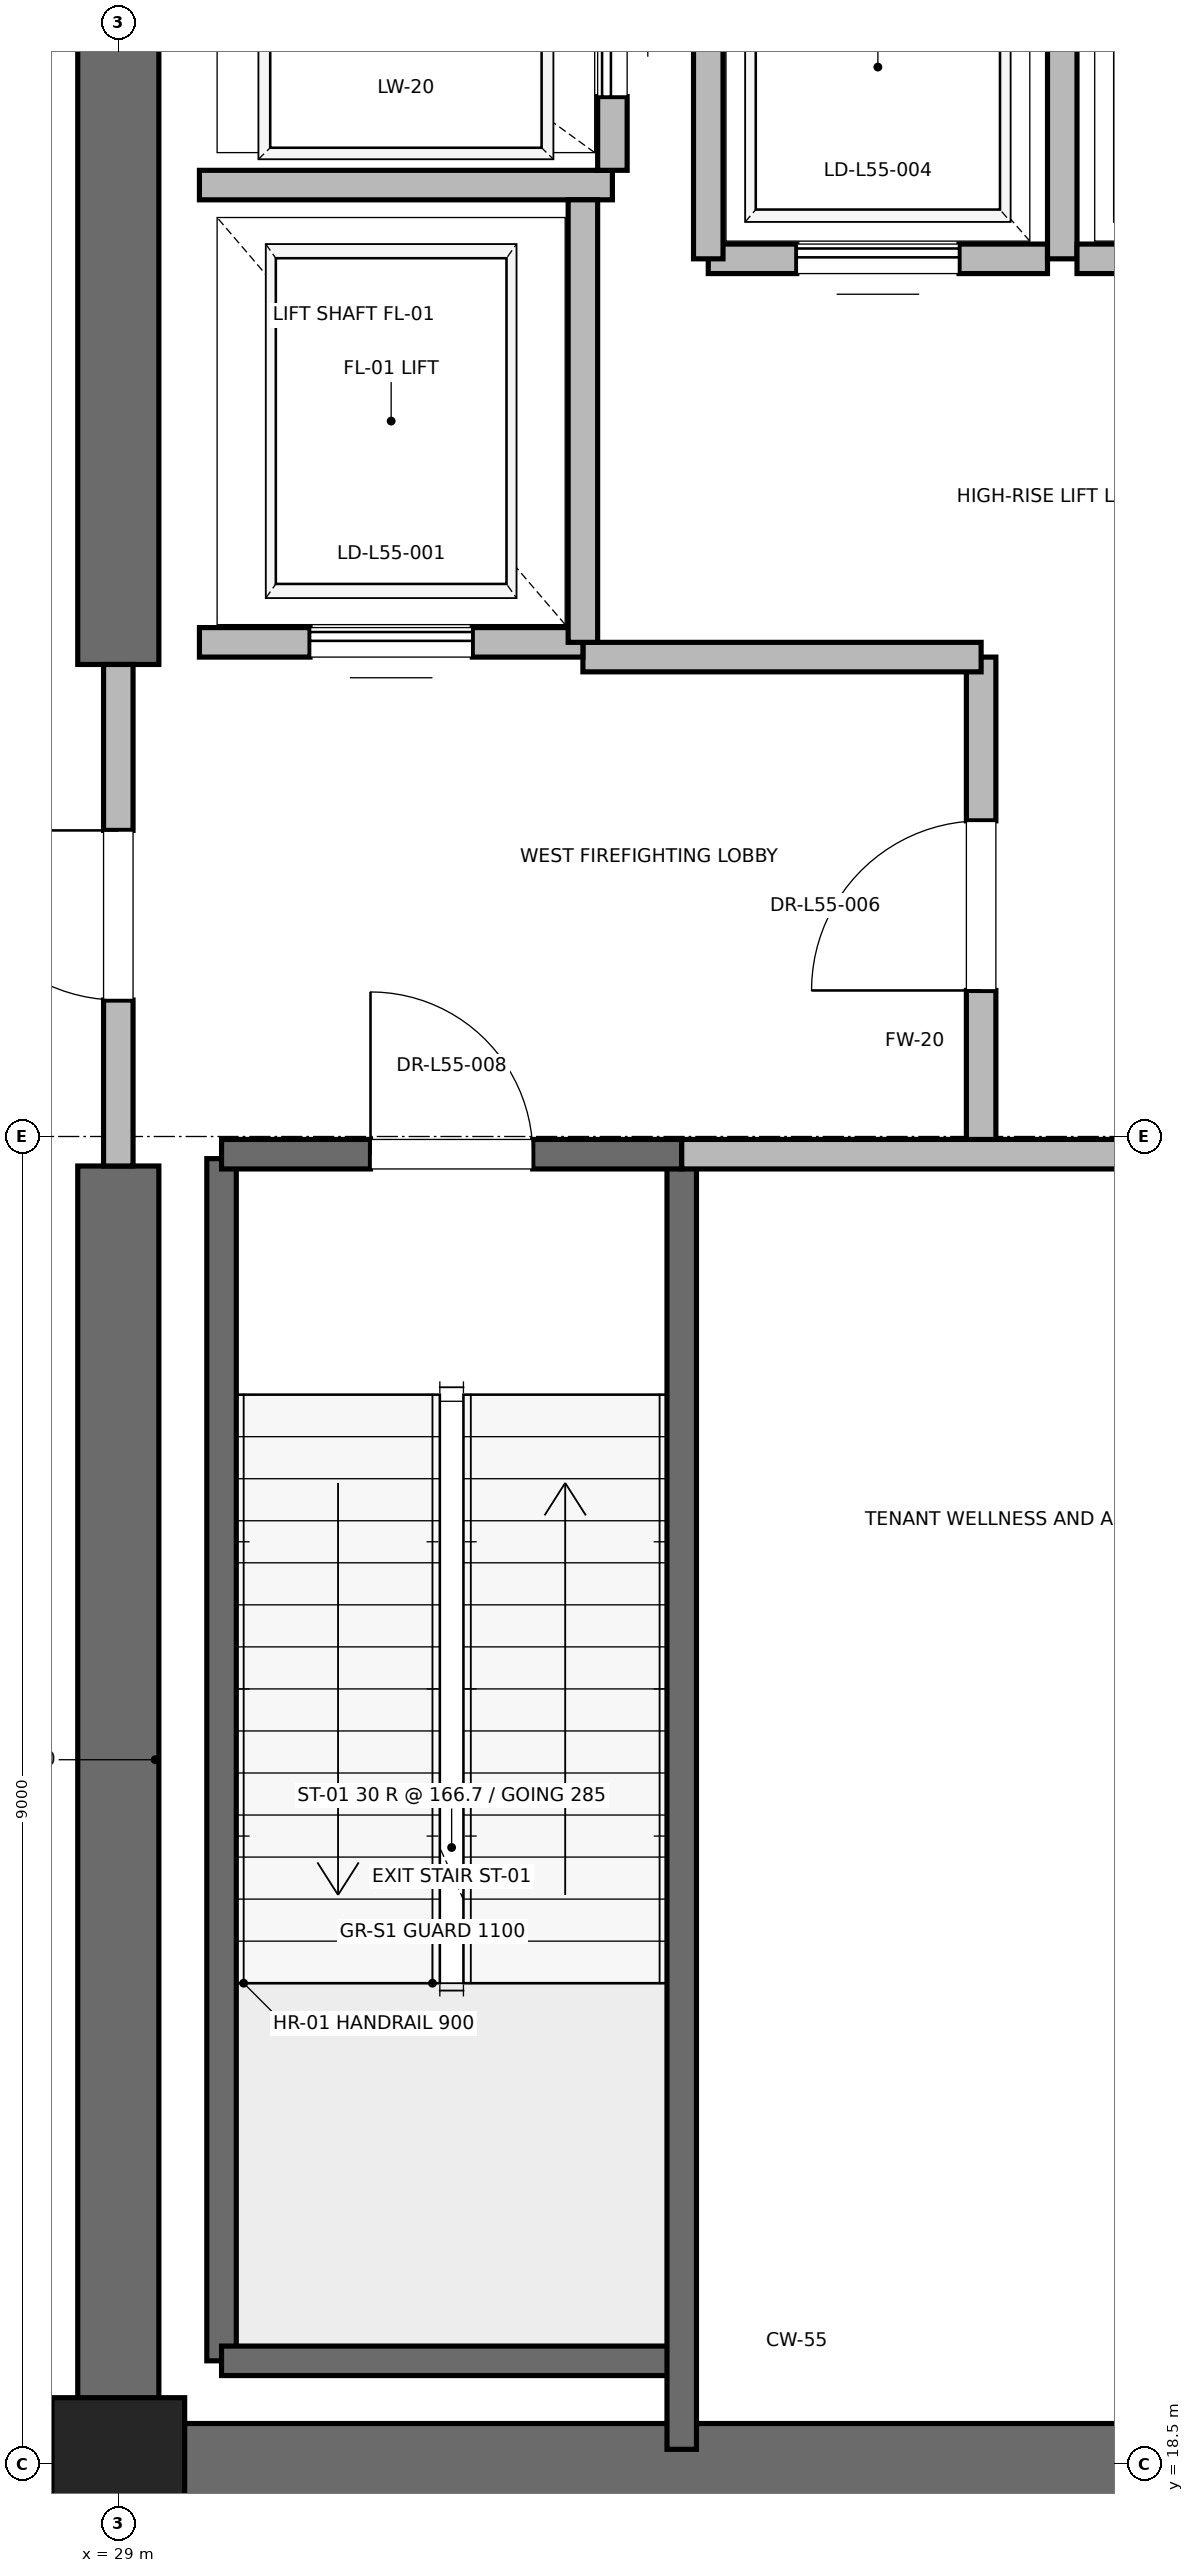
"""IFC4 building model, lengths in metres.
Left out: names, types, materials, properties, quantities, classifications, styles, units other than length and angle.
Written with IfcOpenShell. Run it as: python <this file> out.ifc"""

import sys

from ifc_helpers import new_model, si_unit, direction, frame, frame_2d, origin, origin_2d, place, context, subcontext, project, spatial, rectangle, extrude, element, fill, save


model = new_model("IFC4")
c1 = context("Model", 3, precision=1e-05, world=origin(), true_north=direction((0.0, 1.0)))
c2 = subcontext(c1, "Body", "Model", "MODEL_VIEW")
j1 = project(units=[si_unit("LENGTHUNIT", "METRE"), si_unit("PLANEANGLEUNIT", "RADIAN")], contexts=[c1])
p1 = place(None, origin())
s1 = spatial("IfcSite", under=j1, at=p1, CompositionType="ELEMENT")
p2 = place(p1, origin())
s2 = spatial("IfcBuilding", under=s1, at=p2, CompositionType="ELEMENT")
p3 = place(p2, frame((0.0, 0.0, 238.2)))
s3 = spatial("IfcBuildingStorey", under=s2, at=p3, CompositionType="ELEMENT", Elevation=238.2)
p4 = place(p3, frame((29.0, 18.5, 0.0), z_axis=(0.0, 0.0, 1.0), x_axis=(1.0, 0.0, 0.0)))
e1 = element("IfcColumn", 1, at=p4, inside=s3, PredefinedType="PILASTER", context=c2, shape_type="SweptSolid", body=[
    extrude(rectangle(XDim=0.9, YDim=0.9, at=origin_2d()), origin(), (0.0, 0.0, 1.0), 5.0),
])
p5 = place(p3, frame((29.0, 18.5, 0.0), z_axis=(0.0, 0.0, 1.0), x_axis=(1.0, 0.0, 0.0)))
e2 = element("IfcWall", 2, at=p5, inside=s3, PredefinedType="SHEAR", context=c2, shape_type="SweptSolid", body=[
    extrude(rectangle(XDim=9.2, YDim=0.55, at=frame_2d((4.6, 0.0))), origin(), (0.0, 0.0, 1.0), 4.785),
])
p6 = place(p3, frame((29.0, 18.5, 0.0), z_axis=(0.0, 0.0, 1.0), x_axis=(0.0, 1.0, 0.0)))
e3 = element("IfcWall", 3, at=p6, inside=s3, PredefinedType="SHEAR", context=c2, shape_type="SweptSolid", body=[
    extrude(rectangle(XDim=8.8, YDim=0.55, at=frame_2d((4.4, 0.0))), origin(), (0.0, 0.0, 1.0), 4.785),
])
p7 = place(p3, frame((29.0, 30.7, 0.0), z_axis=(0.0, 0.0, 1.0), x_axis=(0.0, 1.0, 0.0)))
e4 = element("IfcWall", 4, at=p7, inside=s3, PredefinedType="SHEAR", context=c2, shape_type="SweptSolid", body=[
    extrude(rectangle(XDim=5.8, YDim=0.55, at=frame_2d((2.9, 0.0))), origin(), (0.0, 0.0, 1.0), 4.785),
])
p8 = place(p3, frame((29.7, 19.2, 0.0), z_axis=(0.0, 0.0, 1.0), x_axis=(0.0, 1.0, 0.0)))
e5 = element("IfcWall", 5, at=p8, inside=s3, PredefinedType="SOLIDWALL", context=c2, shape_type="SweptSolid", body=[
    extrude(rectangle(XDim=8.15, YDim=0.2, at=frame_2d((4.075, 0.0))), origin(), (0.0, 0.0, 1.0), 4.785),
])
p9 = place(p3, frame((29.7, 19.2, 0.0), z_axis=(0.0, 0.0, 1.0), x_axis=(1.0, 0.0, 0.0)))
e6 = element("IfcWall", 6, at=p9, inside=s3, PredefinedType="SOLIDWALL", context=c2, shape_type="SweptSolid", body=[
    extrude(rectangle(XDim=3.12, YDim=0.2, at=frame_2d((1.56, 0.0))), origin(), (0.0, 0.0, 1.0), 4.785),
])
p10 = place(p3, frame((32.82, 18.6, 0.0), z_axis=(0.0, 0.0, 1.0), x_axis=(0.0, 1.0, 0.0)))
e7 = element("IfcWall", 7, at=p10, inside=s3, PredefinedType="SOLIDWALL", context=c2, shape_type="SweptSolid", body=[
    extrude(rectangle(XDim=8.78, YDim=0.2, at=frame_2d((4.39, 0.0))), origin(), (0.0, 0.0, 1.0), 4.785),
])
p11 = place(p3, frame((29.7, 27.38, 0.0), z_axis=(0.0, 0.0, 1.0), x_axis=(1.0, 0.0, 0.0)))
e8 = element("IfcWall", 8, at=p11, inside=s3, PredefinedType="SOLIDWALL", context=c2, shape_type="SweptSolid", body=[
    extrude(rectangle(XDim=3.12, YDim=0.2, at=frame_2d((1.56, 0.0))), origin(), (0.0, 0.0, 1.0), 4.785),
])
p12 = place(p11, frame((1.01, 0.0, 0.0)))
e9 = element("IfcOpeningElement", 9, at=p12, cuts=e8, PredefinedType="OPENING", context=c2, shape_type="SweptSolid", body=[
    extrude(rectangle(XDim=1.1, YDim=2.15, at=frame_2d((0.55, 1.075))), frame((0.0, 0.1, 0.0), z_axis=(0.0, -1.0, 0.0), x_axis=(1.0, 0.0, 0.0)), (0.0, 0.0, 1.0), 0.2),
])
p13 = place(p3, frame((34.85, 27.38, 0.0), z_axis=(0.0, 0.0, 1.0), x_axis=(0.0, 1.0, 0.0)))
e10 = element("IfcWall", 10, at=p13, inside=s3, PredefinedType="PARTITIONING", context=c2, shape_type="SweptSolid", body=[
    extrude(rectangle(XDim=3.37, YDim=0.2, at=frame_2d((1.685, 0.0))), origin(), (0.0, 0.0, 1.0), 4.785),
])
p14 = place(p13, frame((1.11, 0.0, 0.0)))
e11 = element("IfcOpeningElement", 11, at=p14, cuts=e10, PredefinedType="OPENING", context=c2, shape_type="SweptSolid", body=[
    extrude(rectangle(XDim=1.15, YDim=2.2, at=frame_2d((0.575, 1.1))), frame((0.0, 0.1, 0.0), z_axis=(0.0, -1.0, 0.0), x_axis=(1.0, 0.0, 0.0)), (0.0, 0.0, 1.0), 0.2),
])
p15 = place(p3, frame((29.0, 27.3, 0.0), z_axis=(0.0, 0.0, 1.0), x_axis=(0.0, 1.0, 0.0)))
e12 = element("IfcWall", 12, at=p15, inside=s3, PredefinedType="PARTITIONING", context=c2, shape_type="SweptSolid", body=[
    extrude(rectangle(XDim=3.4, YDim=0.2, at=frame_2d((1.7, 0.0))), origin(), (0.0, 0.0, 1.0), 3.765),
])
p16 = place(p15, frame((1.125, 0.0, 0.0)))
e13 = element("IfcOpeningElement", 13, at=p16, cuts=e12, PredefinedType="OPENING", context=c2, shape_type="SweptSolid", body=[
    extrude(rectangle(XDim=1.15, YDim=2.2, at=frame_2d((0.575, 1.1))), frame((0.0, 0.1, 0.0), z_axis=(0.0, -1.0, 0.0), x_axis=(1.0, 0.0, 0.0)), (0.0, 0.0, 1.0), 0.2),
])
p17 = place(p3, frame((32.82, 27.38, 0.0), z_axis=(0.0, 0.0, 1.0), x_axis=(1.0, 0.0, 0.0)))
e14 = element("IfcWall", 14, at=p17, inside=s3, PredefinedType="PARTITIONING", context=c2, shape_type="SweptSolid", body=[
    extrude(rectangle(XDim=5.62, YDim=0.2, at=frame_2d((2.81, 0.0))), origin(), (0.0, 0.0, 1.0), 4.785),
])
p18 = place(p3, frame((32.15, 30.75, 0.0), z_axis=(0.0, 0.0, 1.0), x_axis=(1.0, 0.0, 0.0)))
e15 = element("IfcWall", 15, at=p18, inside=s3, PredefinedType="PARTITIONING", context=c2, shape_type="SweptSolid", body=[
    extrude(rectangle(XDim=2.7, YDim=0.2, at=frame_2d((1.35, 0.0))), origin(), (0.0, 0.0, 1.0), 4.785),
])
p19 = place(p3, frame((29.55, 30.85, 0.0), z_axis=(0.0, 0.0, 1.0), x_axis=(1.0, 0.0, 0.0)))
e16 = element("IfcWall", 16, at=p19, inside=s3, PredefinedType="SOLIDWALL", context=c2, shape_type="SweptSolid", body=[
    extrude(rectangle(XDim=2.6, YDim=0.2, at=frame_2d((1.3, 0.0))), origin(), (0.0, 0.0, 1.0), 3.765),
])
p20 = place(p19, frame((0.75, 0.0, 0.0)))
e17 = element("IfcOpeningElement", 17, at=p20, cuts=e16, PredefinedType="OPENING", context=c2, shape_type="SweptSolid", body=[
    extrude(rectangle(XDim=1.1, YDim=2.2, at=frame_2d((0.55, 1.1))), frame((0.0, 0.1, 0.0), z_axis=(0.0, -1.0, 0.0), x_axis=(1.0, 0.0, 0.0)), (0.0, 0.0, 1.0), 0.2),
])
p21 = place(p3, frame((29.55, 33.95, 0.0), z_axis=(0.0, 0.0, 1.0), x_axis=(1.0, 0.0, 0.0)))
e18 = element("IfcWall", 18, at=p21, inside=s3, PredefinedType="SOLIDWALL", context=c2, shape_type="SweptSolid", body=[
    extrude(rectangle(XDim=2.8, YDim=0.2, at=frame_2d((1.4, 0.0))), origin(), (0.0, 0.0, 1.0), 4.785),
])
p22 = place(p3, frame((32.15, 30.85, 0.0), z_axis=(0.0, 0.0, 1.0), x_axis=(0.0, 1.0, 0.0)))
e19 = element("IfcWall", 19, at=p22, inside=s3, PredefinedType="SOLIDWALL", context=c2, shape_type="SweptSolid", body=[
    extrude(rectangle(XDim=3.0, YDim=0.2, at=frame_2d((1.5, 0.0))), origin(), (0.0, 0.0, 1.0), 4.785),
])
p23 = place(p3, frame((32.35, 34.05, 0.0), z_axis=(0.0, 0.0, 1.0), x_axis=(0.0, 1.0, 0.0)))
e20 = element("IfcWall", 20, at=p23, inside=s3, PredefinedType="SOLIDWALL", context=c2, shape_type="SweptSolid", body=[
    extrude(rectangle(XDim=2.1, YDim=0.2, at=frame_2d((1.05, 0.0))), origin(), (0.0, 0.0, 1.0), 4.785),
])
p24 = place(p23, frame((0.5, 0.0, 0.0)))
e21 = element("IfcOpeningElement", 21, at=p24, cuts=e20, PredefinedType="OPENING", context=c2, shape_type="SweptSolid", body=[
    extrude(rectangle(XDim=1.1, YDim=2.2, at=frame_2d((0.55, 1.1))), frame((0.0, 0.1, 0.0), z_axis=(0.0, -1.0, 0.0), x_axis=(1.0, 0.0, 0.0)), (0.0, 0.0, 1.0), 0.2),
])
p25 = place(p3, frame((33.0, 33.45, 0.0), z_axis=(0.0, 0.0, 1.0), x_axis=(1.0, 0.0, 0.0)))
e22 = element("IfcWall", 22, at=p25, inside=s3, PredefinedType="SOLIDWALL", context=c2, shape_type="SweptSolid", body=[
    extrude(rectangle(XDim=2.3, YDim=0.2, at=frame_2d((1.15, 0.0))), origin(), (0.0, 0.0, 1.0), 4.785),
])
p26 = place(p25, frame((0.6, 0.0, 0.0)))
e23 = element("IfcOpeningElement", 23, at=p26, cuts=e22, PredefinedType="OPENING", context=c2, shape_type="SweptSolid", body=[
    extrude(rectangle(XDim=1.1, YDim=2.2, at=frame_2d((0.55, 1.1))), frame((0.0, 0.1, 0.0), z_axis=(0.0, -1.0, 0.0), x_axis=(1.0, 0.0, 0.0)), (0.0, 0.0, 1.0), 0.2),
])
p27 = place(p3, frame((33.0, 36.05, 0.0), z_axis=(0.0, 0.0, 1.0), x_axis=(0.0, -1.0, 0.0)))
e24 = element("IfcWall", 24, at=p27, inside=s3, PredefinedType="SOLIDWALL", context=c2, shape_type="SweptSolid", body=[
    extrude(rectangle(XDim=2.6, YDim=0.2, at=frame_2d((1.3, 0.0))), origin(), (0.0, 0.0, 1.0), 4.785),
])
p28 = place(p3, frame((35.4, 33.45, 0.0), z_axis=(0.0, 0.0, 1.0), x_axis=(0.0, 1.0, 0.0)))
e25 = element("IfcWall", 25, at=p28, inside=s3, PredefinedType="SOLIDWALL", context=c2, shape_type="SweptSolid", body=[
    extrude(rectangle(XDim=2.6, YDim=0.2, at=frame_2d((1.3, 0.0))), origin(), (0.0, 0.0, 1.0), 3.765),
])
p29 = place(p3, frame((35.5, 33.45, 0.0), z_axis=(0.0, 0.0, 1.0), x_axis=(1.0, 0.0, 0.0)))
e26 = element("IfcWall", 26, at=p29, inside=s3, PredefinedType="SOLIDWALL", context=c2, shape_type="SweptSolid", body=[
    extrude(rectangle(XDim=2.3, YDim=0.2, at=frame_2d((1.15, 0.0))), origin(), (0.0, 0.0, 1.0), 4.785),
])
p30 = place(p29, frame((0.6, 0.0, 0.0)))
e27 = element("IfcOpeningElement", 27, at=p30, cuts=e26, PredefinedType="OPENING", context=c2, shape_type="SweptSolid", body=[
    extrude(rectangle(XDim=1.1, YDim=2.2, at=frame_2d((0.55, 1.1))), frame((0.0, 0.1, 0.0), z_axis=(0.0, -1.0, 0.0), x_axis=(1.0, 0.0, 0.0)), (0.0, 0.0, 1.0), 0.2),
])
p31 = place(p12, origin())
e28 = element("IfcDoor", 28, at=p31, inside=s3, OperationType="SINGLE_SWING_LEFT", PredefinedType="DOOR", context=c2, shape_type="SweptSolid", body=[
    extrude(rectangle(XDim=1.1, YDim=2.15, at=frame_2d((0.55, 1.075))), frame((0.0, 0.025, 0.0), z_axis=(0.0, -1.0, 0.0), x_axis=(1.0, 0.0, 0.0)), (0.0, 0.0, 1.0), 0.05),
])
fill(e9, e28)
p32 = place(p14, origin())
e29 = element("IfcDoor", 29, at=p32, inside=s3, OperationType="SINGLE_SWING_LEFT", PredefinedType="DOOR", context=c2, shape_type="SweptSolid", body=[
    extrude(rectangle(XDim=1.15, YDim=2.2, at=frame_2d((0.575, 1.1))), frame((0.0, 0.025, 0.0), z_axis=(0.0, -1.0, 0.0), x_axis=(1.0, 0.0, 0.0)), (0.0, 0.0, 1.0), 0.05),
])
fill(e11, e29)
p33 = place(p16, origin())
e30 = element("IfcDoor", 30, at=p33, inside=s3, OperationType="SINGLE_SWING_RIGHT", PredefinedType="DOOR", context=c2, shape_type="SweptSolid", body=[
    extrude(rectangle(XDim=1.15, YDim=2.2, at=frame_2d((0.575, 1.1))), frame((0.0, 0.025, 0.0), z_axis=(0.0, -1.0, 0.0), x_axis=(1.0, 0.0, 0.0)), (0.0, 0.0, 1.0), 0.05),
])
fill(e13, e30)
p34 = place(p20, origin())
e31 = element("IfcDoor", 31, at=p34, inside=s3, OperationType="SLIDING_TO_RIGHT", PredefinedType="DOOR", context=c2, shape_type="SweptSolid", body=[
    extrude(rectangle(XDim=1.1, YDim=2.2, at=frame_2d((0.55, 1.1))), frame((0.0, 0.025, 0.0), z_axis=(0.0, -1.0, 0.0), x_axis=(1.0, 0.0, 0.0)), (0.0, 0.0, 1.0), 0.05),
])
fill(e17, e31)
p35 = place(p24, origin())
e32 = element("IfcDoor", 32, at=p35, inside=s3, OperationType="SLIDING_TO_RIGHT", PredefinedType="DOOR", context=c2, shape_type="SweptSolid", body=[
    extrude(rectangle(XDim=1.1, YDim=2.2, at=frame_2d((0.55, 1.1))), frame((0.0, 0.025, 0.0), z_axis=(0.0, -1.0, 0.0), x_axis=(1.0, 0.0, 0.0)), (0.0, 0.0, 1.0), 0.05),
])
fill(e21, e32)
p36 = place(p26, origin())
e33 = element("IfcDoor", 33, at=p36, inside=s3, OperationType="SLIDING_TO_RIGHT", PredefinedType="DOOR", context=c2, shape_type="SweptSolid", body=[
    extrude(rectangle(XDim=1.1, YDim=2.2, at=frame_2d((0.55, 1.1))), frame((0.0, 0.025, 0.0), z_axis=(0.0, -1.0, 0.0), x_axis=(1.0, 0.0, 0.0)), (0.0, 0.0, 1.0), 0.05),
])
fill(e23, e33)
save(model, sys.argv[1])
